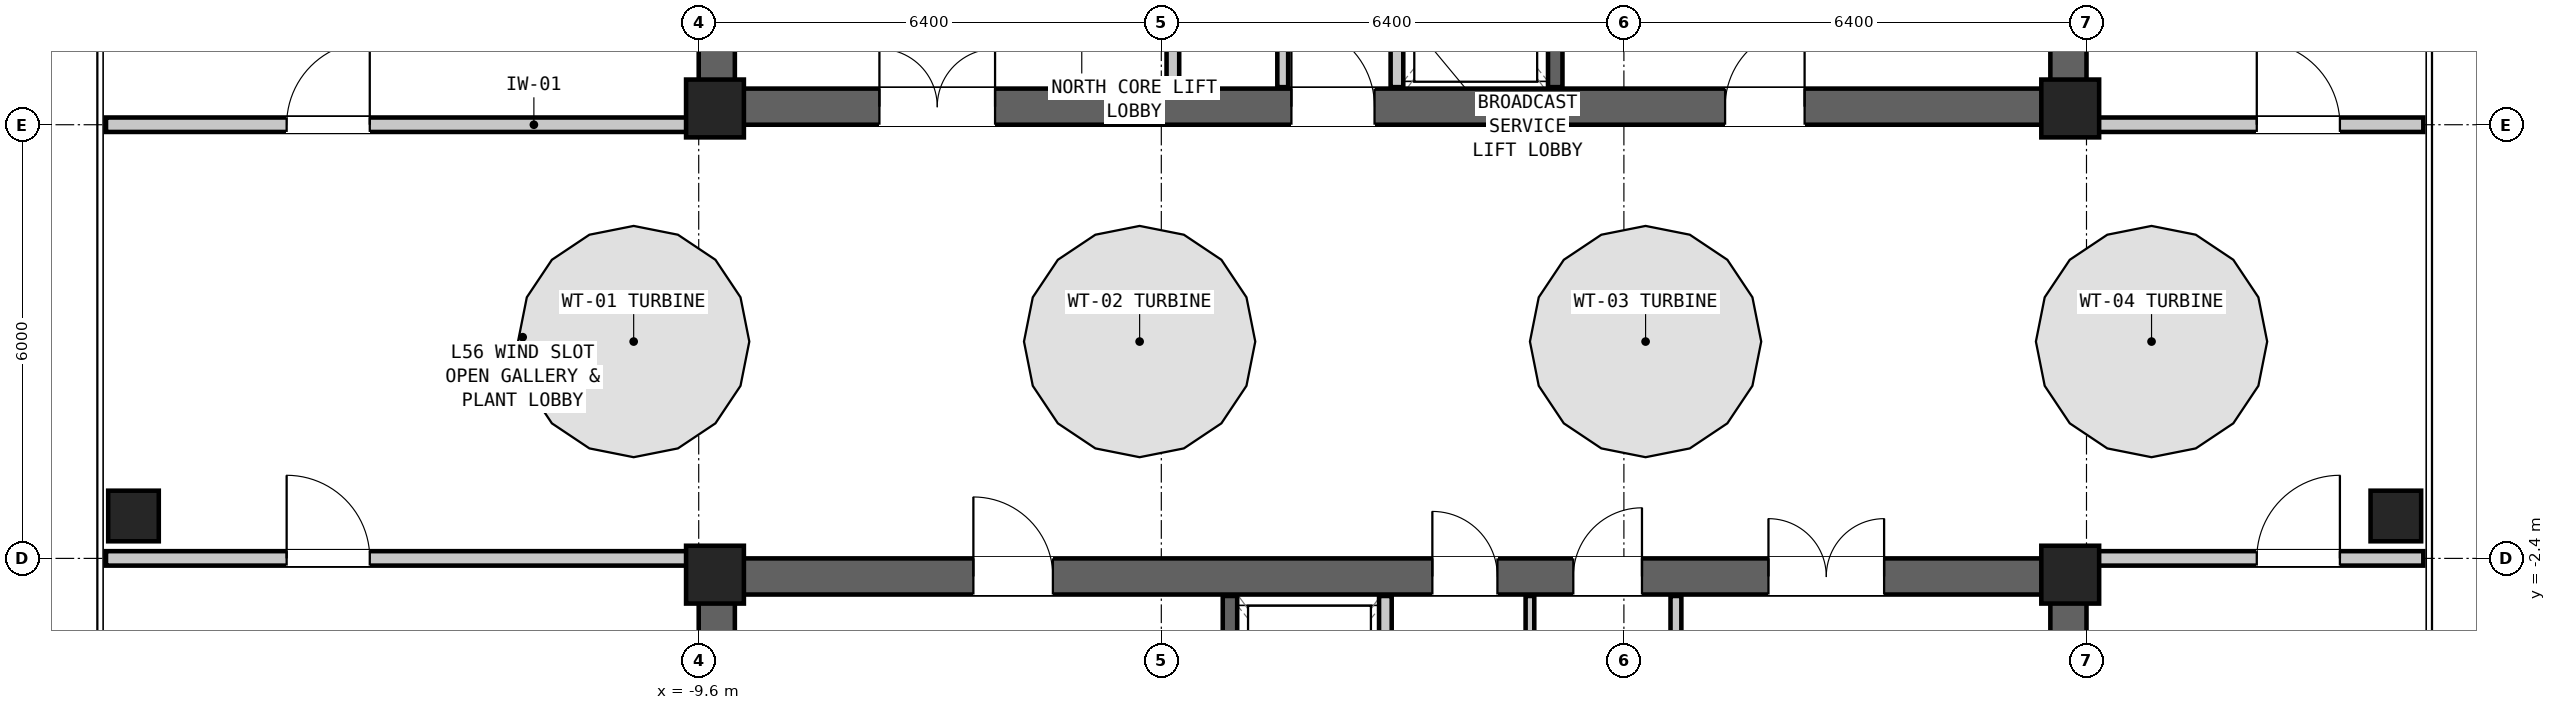
"""IFC4 building model, lengths in metres.
Left out: names, types, materials, properties, quantities, classifications, styles, units other than length and angle.
Written with IfcOpenShell. Run it as: python <this file> out.ifc"""

import sys

from ifc_helpers import new_model, si_unit, direction, frame, frame_2d, origin, origin_2d, place, context, subcontext, project, spatial, rectangle, hollow_rectangle, extrude, element, fill, save


model = new_model("IFC4")
c1 = context("Model", 3, precision=1e-05, world=origin(), true_north=direction((0.0, 1.0)))
c2 = subcontext(c1, "Body", "Model", "MODEL_VIEW")
j1 = project(units=[si_unit("LENGTHUNIT", "METRE"), si_unit("PLANEANGLEUNIT", "RADIAN")], contexts=[c1])
p1 = place(None, origin())
s1 = spatial("IfcSite", under=j1, at=p1, CompositionType="ELEMENT")
p2 = place(p1, origin())
s2 = spatial("IfcBuilding", under=s1, at=p2, CompositionType="ELEMENT")
p3 = place(p2, frame((0.0, 0.0, 191.55)))
s3 = spatial("IfcBuildingStorey", under=s2, at=p3, CompositionType="ELEMENT", Elevation=191.55)
p4 = place(p3, frame((-9.6, 3.85, 0.0), z_axis=(0.0, 0.0, 1.0), x_axis=(1.0, 0.0, 0.0)))
e1 = element("IfcWall", 1, at=p4, inside=s3, PredefinedType="SHEAR", context=c2, shape_type="SweptSolid", body=[
    extrude(rectangle(XDim=19.2, YDim=0.5, at=frame_2d((9.6, 0.0))), origin(), (0.0, 0.0, 1.0), 3.6),
])
p5 = place(p4, frame((14.2, 0.0, 0.0)))
e2 = element("IfcOpeningElement", 2, at=p5, cuts=e1, PredefinedType="OPENING", context=c2, shape_type="SweptSolid", body=[
    extrude(rectangle(XDim=1.1, YDim=2.08, at=frame_2d((0.55, 1.04))), frame((0.0, 0.262, 0.0), z_axis=(0.0, -1.0, 0.0), x_axis=(1.0, 0.0, 0.0)), (0.0, 0.0, 1.0), 0.524),
])
p6 = place(p4, frame((8.2, 0.0, 0.0)))
e3 = element("IfcOpeningElement", 3, at=p6, cuts=e1, PredefinedType="OPENING", context=c2, shape_type="SweptSolid", body=[
    extrude(rectangle(XDim=1.15, YDim=2.1, at=frame_2d((0.575, 1.05))), frame((0.0, 0.262, 0.0), z_axis=(0.0, -1.0, 0.0), x_axis=(1.0, 0.0, 0.0)), (0.0, 0.0, 1.0), 0.524),
])
p7 = place(p4, frame((2.5, 0.0, 0.0)))
e4 = element("IfcOpeningElement", 4, at=p7, cuts=e1, PredefinedType="OPENING", context=c2, shape_type="SweptSolid", body=[
    extrude(rectangle(XDim=1.6, YDim=2.12, at=frame_2d((0.8, 1.06))), frame((0.0, 0.262, 0.0), z_axis=(0.0, -1.0, 0.0), x_axis=(1.0, 0.0, 0.0)), (0.0, 0.0, 1.0), 0.524),
])
for number, where, z_axis, x_axis in (
    (5, (-9.35, 3.6, 0.0), (0.0, 0.0, 1.0), (0.0, 1.0, 0.0)),
    (6, (9.35, 3.6, 0.0), (0.0, 0.0, 1.0), (0.0, 1.0, 0.0)),
):
    element("IfcWall", number, at=place(p3, frame(where, z_axis=z_axis, x_axis=x_axis)), inside=s3, PredefinedType="SHEAR", context=c2, shape_type="SweptSolid", body=[
        extrude(rectangle(XDim=6.6, YDim=0.5, at=frame_2d((3.3, 0.0))), origin(), (0.0, 0.0, 1.0), 3.6),
    ])
p8 = place(p3, frame((-9.6, -2.65, 0.0), z_axis=(0.0, 0.0, 1.0), x_axis=(1.0, 0.0, 0.0)))
e7 = element("IfcWall", 7, at=p8, inside=s3, PredefinedType="SHEAR", context=c2, shape_type="SweptSolid", body=[
    extrude(rectangle(XDim=19.2, YDim=0.5, at=frame_2d((9.6, 0.0))), origin(), (0.0, 0.0, 1.0), 3.6),
])
p9 = place(p8, frame((3.8, 0.0, 0.0)))
e8 = element("IfcOpeningElement", 8, at=p9, cuts=e7, PredefinedType="OPENING", context=c2, shape_type="SweptSolid", body=[
    extrude(rectangle(XDim=1.1, YDim=2.08, at=frame_2d((0.55, 1.04))), frame((0.0, 0.262, 0.0), z_axis=(0.0, -1.0, 0.0), x_axis=(1.0, 0.0, 0.0)), (0.0, 0.0, 1.0), 0.524),
])
p10 = place(p8, frame((10.15, 0.0, 0.0)))
e9 = element("IfcOpeningElement", 9, at=p10, cuts=e7, PredefinedType="OPENING", context=c2, shape_type="SweptSolid", body=[
    extrude(rectangle(XDim=0.9, YDim=2.05, at=frame_2d((0.45, 1.025))), frame((0.0, 0.262, 0.0), z_axis=(0.0, -1.0, 0.0), x_axis=(1.0, 0.0, 0.0)), (0.0, 0.0, 1.0), 0.524),
])
p11 = place(p8, frame((12.1, 0.0, 0.0)))
e10 = element("IfcOpeningElement", 10, at=p11, cuts=e7, PredefinedType="OPENING", context=c2, shape_type="SweptSolid", body=[
    extrude(rectangle(XDim=0.95, YDim=2.1, at=frame_2d((0.475, 1.05))), frame((0.0, 0.262, 0.0), z_axis=(0.0, -1.0, 0.0), x_axis=(1.0, 0.0, 0.0)), (0.0, 0.0, 1.0), 0.524),
])
p12 = place(p8, frame((14.8, 0.0, 0.0)))
e11 = element("IfcOpeningElement", 11, at=p12, cuts=e7, PredefinedType="OPENING", context=c2, shape_type="SweptSolid", body=[
    extrude(rectangle(XDim=1.6, YDim=2.12, at=frame_2d((0.8, 1.06))), frame((0.0, 0.262, 0.0), z_axis=(0.0, -1.0, 0.0), x_axis=(1.0, 0.0, 0.0)), (0.0, 0.0, 1.0), 0.524),
])
for number, where, z_axis, x_axis in (
    (12, (-9.35, -9.0, 0.0), (0.0, 0.0, 1.0), (0.0, 1.0, 0.0)),
    (13, (9.35, -9.0, 0.0), (0.0, 0.0, 1.0), (0.0, 1.0, 0.0)),
):
    element("IfcWall", number, at=place(p3, frame(where, z_axis=z_axis, x_axis=x_axis)), inside=s3, PredefinedType="SHEAR", context=c2, shape_type="SweptSolid", body=[
        extrude(rectangle(XDim=6.6, YDim=0.5, at=frame_2d((3.3, 0.0))), origin(), (0.0, 0.0, 1.0), 3.6),
    ])
for number, where, z_axis, x_axis in (
    (14, (13.88, -1.813, 0.0), (0.0, 0.0, 1.0), (0.0, 1.0, 0.0)),
    (15, (-17.42, -1.813, 0.0), (0.0, 0.0, 1.0), (0.0, 1.0, 0.0)),
):
    element("IfcColumn", number, at=place(p3, frame(where, z_axis=z_axis, x_axis=x_axis)), inside=s3, PredefinedType="COLUMN", context=c2, shape_type="SweptSolid", body=[
        extrude(hollow_rectangle(XDim=0.7, YDim=0.7, WallThickness=0.045, at=origin_2d()), origin(), (0.0, 0.0, 1.0), 3.6),
    ])
for number, where, z_axis, x_axis in (
    (16, (-9.375, 3.825, 0.0), (0.0, 0.0, 1.0), (1.0, 0.0, 0.0)),
    (17, (9.375, 3.825, 0.0), (0.0, 0.0, 1.0), (1.0, 0.0, 0.0)),
    (18, (-9.375, -2.625, 0.0), (0.0, 0.0, 1.0), (1.0, 0.0, 0.0)),
    (19, (9.375, -2.625, 0.0), (0.0, 0.0, 1.0), (1.0, 0.0, 0.0)),
):
    element("IfcColumn", number, at=place(p3, frame(where, z_axis=z_axis, x_axis=x_axis)), inside=s3, PredefinedType="COLUMN", context=c2, shape_type="SweptSolid", body=[
        extrude(rectangle(XDim=0.8, YDim=0.8, at=origin_2d()), origin(), (0.0, 0.0, 1.0), 3.6),
    ])
p13 = place(p3, frame((2.25, 4.12, 0.0), z_axis=(0.0, 0.0, 1.0), x_axis=(0.0, 1.0, 0.0)))
e20 = element("IfcWall", 20, at=p13, inside=s3, PredefinedType="SHEAR", context=c2, shape_type="SweptSolid", body=[
    extrude(rectangle(XDim=5.56, YDim=0.2, at=frame_2d((2.78, 0.0))), origin(), (0.0, 0.0, 1.0), 3.22),
])
p14 = place(p13, frame((0.65, 0.0, 0.0)))
e21 = element("IfcOpeningElement", 21, at=p14, cuts=e20, PredefinedType="OPENING", context=c2, shape_type="SweptSolid", body=[
    extrude(rectangle(XDim=1.15, YDim=2.08, at=frame_2d((0.575, 1.04))), frame((0.0, 0.112, 0.0), z_axis=(0.0, -1.0, 0.0), x_axis=(1.0, 0.0, 0.0)), (0.0, 0.0, 1.0), 0.224),
])
p15 = place(p3, frame((0.06, 4.12, 0.0), z_axis=(0.0, 0.0, 1.0), x_axis=(0.0, 1.0, 0.0)))
e22 = element("IfcWall", 22, at=p15, inside=s3, PredefinedType="PARTITIONING", context=c2, shape_type="SweptSolid", body=[
    extrude(rectangle(XDim=5.56, YDim=0.175, at=frame_2d((2.78, 0.0))), origin(), (0.0, 0.0, 1.0), 3.22),
])
p16 = place(p15, frame((3.1, 0.0, 0.0)))
e23 = element("IfcOpeningElement", 23, at=p16, cuts=e22, PredefinedType="OPENING", context=c2, shape_type="SweptSolid", body=[
    extrude(rectangle(XDim=1.4, YDim=2.12, at=frame_2d((0.7, 1.06))), frame((0.0, 0.1, 0.0), z_axis=(0.0, -1.0, 0.0), x_axis=(1.0, 0.0, 0.0)), (0.0, 0.0, 1.0), 0.199),
])
p17 = place(p3, frame((-3.04, 4.12, 0.0), z_axis=(0.0, 0.0, 1.0), x_axis=(0.0, 1.0, 0.0)))
e24 = element("IfcWall", 24, at=p17, inside=s3, PredefinedType="PARTITIONING", context=c2, shape_type="SweptSolid", body=[
    extrude(rectangle(XDim=5.56, YDim=0.175, at=frame_2d((2.78, 0.0))), origin(), (0.0, 0.0, 1.0), 3.22),
])
p18 = place(p3, frame((-1.52, 4.12, 0.0), z_axis=(0.0, 0.0, 1.0), x_axis=(0.0, 1.0, 0.0)))
e25 = element("IfcWall", 25, at=p18, inside=s3, PredefinedType="PARTITIONING", context=c2, shape_type="SweptSolid", body=[
    extrude(rectangle(XDim=5.56, YDim=0.15, at=frame_2d((2.78, 0.0))), origin(), (0.0, 0.0, 1.0), 3.22),
])
p19 = place(p18, frame((3.95, 0.0, 0.0)))
e26 = element("IfcOpeningElement", 26, at=p19, cuts=e25, PredefinedType="OPENING", context=c2, shape_type="SweptSolid", body=[
    extrude(rectangle(XDim=0.9, YDim=2.05, at=frame_2d((0.45, 1.025))), frame((0.0, 0.087, 0.0), z_axis=(0.0, -1.0, 0.0), x_axis=(1.0, 0.0, 0.0)), (0.0, 0.0, 1.0), 0.174),
])
p20 = place(p18, frame((2.2, 0.0, 0.0)))
e27 = element("IfcOpeningElement", 27, at=p20, cuts=e25, PredefinedType="OPENING", context=c2, shape_type="SweptSolid", body=[
    extrude(rectangle(XDim=0.9, YDim=2.05, at=frame_2d((0.45, 1.025))), frame((0.0, 0.087, 0.0), z_axis=(0.0, -1.0, 0.0), x_axis=(1.0, 0.0, 0.0)), (0.0, 0.0, 1.0), 0.174),
])
p21 = place(p18, frame((0.55, 0.0, 0.0)))
e28 = element("IfcOpeningElement", 28, at=p21, cuts=e25, PredefinedType="OPENING", context=c2, shape_type="SweptSolid", body=[
    extrude(rectangle(XDim=0.92, YDim=2.1, at=frame_2d((0.46, 1.05))), frame((0.0, 0.087, 0.0), z_axis=(0.0, -1.0, 0.0), x_axis=(1.0, 0.0, 0.0)), (0.0, 0.0, 1.0), 0.174),
])
p22 = place(p3, frame((-2.25, -8.48, 0.0), z_axis=(0.0, 0.0, 1.0), x_axis=(0.0, 1.0, 0.0)))
e29 = element("IfcWall", 29, at=p22, inside=s3, PredefinedType="SHEAR", context=c2, shape_type="SweptSolid", body=[
    extrude(rectangle(XDim=5.56, YDim=0.2, at=frame_2d((2.78, 0.0))), origin(), (0.0, 0.0, 1.0), 3.22),
])
p23 = place(p22, frame((3.35, 0.0, 0.0)))
e30 = element("IfcOpeningElement", 30, at=p23, cuts=e29, PredefinedType="OPENING", context=c2, shape_type="SweptSolid", body=[
    extrude(rectangle(XDim=1.15, YDim=2.08, at=frame_2d((0.575, 1.04))), frame((0.0, 0.112, 0.0), z_axis=(0.0, -1.0, 0.0), x_axis=(1.0, 0.0, 0.0)), (0.0, 0.0, 1.0), 0.224),
])
p24 = place(p3, frame((-0.1, -8.48, 0.0), z_axis=(0.0, 0.0, 1.0), x_axis=(0.0, 1.0, 0.0)))
e31 = element("IfcWall", 31, at=p24, inside=s3, PredefinedType="PARTITIONING", context=c2, shape_type="SweptSolid", body=[
    extrude(rectangle(XDim=5.56, YDim=0.175, at=frame_2d((2.78, 0.0))), origin(), (0.0, 0.0, 1.0), 3.22),
])
p25 = place(p24, frame((0.45, 0.0, 0.0)))
e32 = element("IfcOpeningElement", 32, at=p25, cuts=e31, PredefinedType="OPENING", context=c2, shape_type="SweptSolid", body=[
    extrude(rectangle(XDim=0.9, YDim=2.05, at=frame_2d((0.45, 1.025))), frame((0.0, 0.1, 0.0), z_axis=(0.0, -1.0, 0.0), x_axis=(1.0, 0.0, 0.0)), (0.0, 0.0, 1.0), 0.199),
])
p26 = place(p3, frame((3.92, -8.48, 0.0), z_axis=(0.0, 0.0, 1.0), x_axis=(0.0, 1.0, 0.0)))
e33 = element("IfcWall", 33, at=p26, inside=s3, PredefinedType="PARTITIONING", context=c2, shape_type="SweptSolid", body=[
    extrude(rectangle(XDim=5.56, YDim=0.15, at=frame_2d((2.78, 0.0))), origin(), (0.0, 0.0, 1.0), 3.22),
])
p27 = place(p3, frame((1.9, -8.48, 0.0), z_axis=(0.0, 0.0, 1.0), x_axis=(0.0, 1.0, 0.0)))
e34 = element("IfcWall", 34, at=p27, inside=s3, PredefinedType="PARTITIONING", context=c2, shape_type="SweptSolid", body=[
    extrude(rectangle(XDim=5.56, YDim=0.12, at=frame_2d((2.78, 0.0))), origin(), (0.0, 0.0, 1.0), 3.22),
])
p28 = place(p3, frame((-17.8, 3.6, 0.0), z_axis=(0.0, 0.0, 1.0), x_axis=(1.0, 0.0, 0.0)))
e35 = element("IfcWall", 35, at=p28, inside=s3, PredefinedType="PARTITIONING", context=c2, shape_type="SweptSolid", body=[
    extrude(rectangle(XDim=8.09, YDim=0.2, at=frame_2d((4.045, 0.0))), origin(), (0.0, 0.0, 1.0), 2.42),
])
p29 = place(p28, frame((2.499, 0.0, 0.0)))
e36 = element("IfcOpeningElement", 36, at=p29, cuts=e35, PredefinedType="OPENING", context=c2, shape_type="SweptSolid", body=[
    extrude(rectangle(XDim=1.15, YDim=2.1, at=frame_2d((0.575, 1.05))), frame((0.0, 0.112, 0.0), z_axis=(0.0, -1.0, 0.0), x_axis=(1.0, 0.0, 0.0)), (0.0, 0.0, 1.0), 0.224),
])
p30 = place(p3, frame((9.71, 3.6, 0.0), z_axis=(0.0, 0.0, 1.0), x_axis=(1.0, 0.0, 0.0)))
e37 = element("IfcWall", 37, at=p30, inside=s3, PredefinedType="PARTITIONING", context=c2, shape_type="SweptSolid", body=[
    extrude(rectangle(XDim=4.55, YDim=0.2, at=frame_2d((2.275, 0.0))), origin(), (0.0, 0.0, 1.0), 2.42),
])
p31 = place(p30, frame((2.246, 0.0, 0.0)))
e38 = element("IfcOpeningElement", 38, at=p31, cuts=e37, PredefinedType="OPENING", context=c2, shape_type="SweptSolid", body=[
    extrude(rectangle(XDim=1.15, YDim=2.1, at=frame_2d((0.575, 1.05))), frame((0.0, 0.112, 0.0), z_axis=(0.0, -1.0, 0.0), x_axis=(1.0, 0.0, 0.0)), (0.0, 0.0, 1.0), 0.224),
])
p32 = place(p3, frame((-17.8, -2.4, 0.0), z_axis=(0.0, 0.0, 1.0), x_axis=(1.0, 0.0, 0.0)))
e39 = element("IfcWall", 39, at=p32, inside=s3, PredefinedType="PARTITIONING", context=c2, shape_type="SweptSolid", body=[
    extrude(rectangle(XDim=8.09, YDim=0.2, at=frame_2d((4.045, 0.0))), origin(), (0.0, 0.0, 1.0), 2.42),
])
p33 = place(p32, frame((2.499, 0.0, 0.0)))
e40 = element("IfcOpeningElement", 40, at=p33, cuts=e39, PredefinedType="OPENING", context=c2, shape_type="SweptSolid", body=[
    extrude(rectangle(XDim=1.15, YDim=2.1, at=frame_2d((0.575, 1.05))), frame((0.0, 0.112, 0.0), z_axis=(0.0, -1.0, 0.0), x_axis=(1.0, 0.0, 0.0)), (0.0, 0.0, 1.0), 0.224),
])
p34 = place(p3, frame((9.71, -2.4, 0.0), z_axis=(0.0, 0.0, 1.0), x_axis=(1.0, 0.0, 0.0)))
e41 = element("IfcWall", 41, at=p34, inside=s3, PredefinedType="PARTITIONING", context=c2, shape_type="SweptSolid", body=[
    extrude(rectangle(XDim=4.55, YDim=0.2, at=frame_2d((2.275, 0.0))), origin(), (0.0, 0.0, 1.0), 2.42),
])
p35 = place(p34, frame((2.246, 0.0, 0.0)))
e42 = element("IfcOpeningElement", 42, at=p35, cuts=e41, PredefinedType="OPENING", context=c2, shape_type="SweptSolid", body=[
    extrude(rectangle(XDim=1.15, YDim=2.1, at=frame_2d((0.575, 1.05))), frame((0.0, 0.112, 0.0), z_axis=(0.0, -1.0, 0.0), x_axis=(1.0, 0.0, 0.0)), (0.0, 0.0, 1.0), 0.224),
])
p36 = place(p5, origin())
e43 = element("IfcDoor", 43, at=p36, inside=s3, OperationType="SINGLE_SWING_RIGHT", PredefinedType="DOOR", context=c2, shape_type="SweptSolid", body=[
    extrude(rectangle(XDim=1.1, YDim=2.08, at=frame_2d((0.55, 1.04))), frame((0.0, 0.025, 0.0), z_axis=(0.0, -1.0, 0.0), x_axis=(1.0, 0.0, 0.0)), (0.0, 0.0, 1.0), 0.05),
])
fill(e2, e43)
p37 = place(p6, origin())
e44 = element("IfcDoor", 44, at=p37, inside=s3, OperationType="SINGLE_SWING_LEFT", PredefinedType="DOOR", context=c2, shape_type="SweptSolid", body=[
    extrude(rectangle(XDim=1.15, YDim=2.1, at=frame_2d((0.575, 1.05))), frame((0.0, 0.025, 0.0), z_axis=(0.0, -1.0, 0.0), x_axis=(1.0, 0.0, 0.0)), (0.0, 0.0, 1.0), 0.05),
])
fill(e3, e44)
p38 = place(p7, origin())
e45 = element("IfcDoor", 45, at=p38, inside=s3, OperationType="DOUBLE_DOOR_SINGLE_SWING", PredefinedType="DOOR", context=c2, shape_type="SweptSolid", body=[
    extrude(rectangle(XDim=1.6, YDim=2.12, at=frame_2d((0.8, 1.06))), frame((0.0, 0.025, 0.0), z_axis=(0.0, -1.0, 0.0), x_axis=(1.0, 0.0, 0.0)), (0.0, 0.0, 1.0), 0.05),
])
fill(e4, e45)
p39 = place(p9, origin())
e46 = element("IfcDoor", 46, at=p39, inside=s3, OperationType="SINGLE_SWING_LEFT", PredefinedType="DOOR", context=c2, shape_type="SweptSolid", body=[
    extrude(rectangle(XDim=1.1, YDim=2.08, at=frame_2d((0.55, 1.04))), frame((0.0, 0.025, 0.0), z_axis=(0.0, -1.0, 0.0), x_axis=(1.0, 0.0, 0.0)), (0.0, 0.0, 1.0), 0.05),
])
fill(e8, e46)
p40 = place(p10, origin())
e47 = element("IfcDoor", 47, at=p40, inside=s3, OperationType="SINGLE_SWING_LEFT", PredefinedType="DOOR", context=c2, shape_type="SweptSolid", body=[
    extrude(rectangle(XDim=0.9, YDim=2.05, at=frame_2d((0.45, 1.025))), frame((0.0, 0.025, 0.0), z_axis=(0.0, -1.0, 0.0), x_axis=(1.0, 0.0, 0.0)), (0.0, 0.0, 1.0), 0.05),
])
fill(e9, e47)
p41 = place(p11, origin())
e48 = element("IfcDoor", 48, at=p41, inside=s3, OperationType="SINGLE_SWING_RIGHT", PredefinedType="DOOR", context=c2, shape_type="SweptSolid", body=[
    extrude(rectangle(XDim=0.95, YDim=2.1, at=frame_2d((0.475, 1.05))), frame((0.0, 0.025, 0.0), z_axis=(0.0, -1.0, 0.0), x_axis=(1.0, 0.0, 0.0)), (0.0, 0.0, 1.0), 0.05),
])
fill(e10, e48)
p42 = place(p12, origin())
e49 = element("IfcDoor", 49, at=p42, inside=s3, OperationType="DOUBLE_DOOR_SINGLE_SWING", PredefinedType="DOOR", context=c2, shape_type="SweptSolid", body=[
    extrude(rectangle(XDim=1.6, YDim=2.12, at=frame_2d((0.8, 1.06))), frame((0.0, 0.025, 0.0), z_axis=(0.0, -1.0, 0.0), x_axis=(1.0, 0.0, 0.0)), (0.0, 0.0, 1.0), 0.05),
])
fill(e11, e49)
p43 = place(p29, origin())
e50 = element("IfcDoor", 50, at=p43, inside=s3, OperationType="SINGLE_SWING_RIGHT", PredefinedType="DOOR", context=c2, shape_type="SweptSolid", body=[
    extrude(rectangle(XDim=1.15, YDim=2.1, at=frame_2d((0.575, 1.05))), frame((0.0, 0.025, 0.0), z_axis=(0.0, -1.0, 0.0), x_axis=(1.0, 0.0, 0.0)), (0.0, 0.0, 1.0), 0.05),
])
fill(e36, e50)
p44 = place(p31, origin())
e51 = element("IfcDoor", 51, at=p44, inside=s3, OperationType="SINGLE_SWING_LEFT", PredefinedType="DOOR", context=c2, shape_type="SweptSolid", body=[
    extrude(rectangle(XDim=1.15, YDim=2.1, at=frame_2d((0.575, 1.05))), frame((0.0, 0.025, 0.0), z_axis=(0.0, -1.0, 0.0), x_axis=(1.0, 0.0, 0.0)), (0.0, 0.0, 1.0), 0.05),
])
fill(e38, e51)
p45 = place(p33, origin())
e52 = element("IfcDoor", 52, at=p45, inside=s3, OperationType="SINGLE_SWING_LEFT", PredefinedType="DOOR", context=c2, shape_type="SweptSolid", body=[
    extrude(rectangle(XDim=1.15, YDim=2.1, at=frame_2d((0.575, 1.05))), frame((0.0, 0.025, 0.0), z_axis=(0.0, -1.0, 0.0), x_axis=(1.0, 0.0, 0.0)), (0.0, 0.0, 1.0), 0.05),
])
fill(e40, e52)
p46 = place(p35, origin())
e53 = element("IfcDoor", 53, at=p46, inside=s3, OperationType="SINGLE_SWING_RIGHT", PredefinedType="DOOR", context=c2, shape_type="SweptSolid", body=[
    extrude(rectangle(XDim=1.15, YDim=2.1, at=frame_2d((0.575, 1.05))), frame((0.0, 0.025, 0.0), z_axis=(0.0, -1.0, 0.0), x_axis=(1.0, 0.0, 0.0)), (0.0, 0.0, 1.0), 0.05),
])
fill(e42, e53)
save(model, sys.argv[1])
